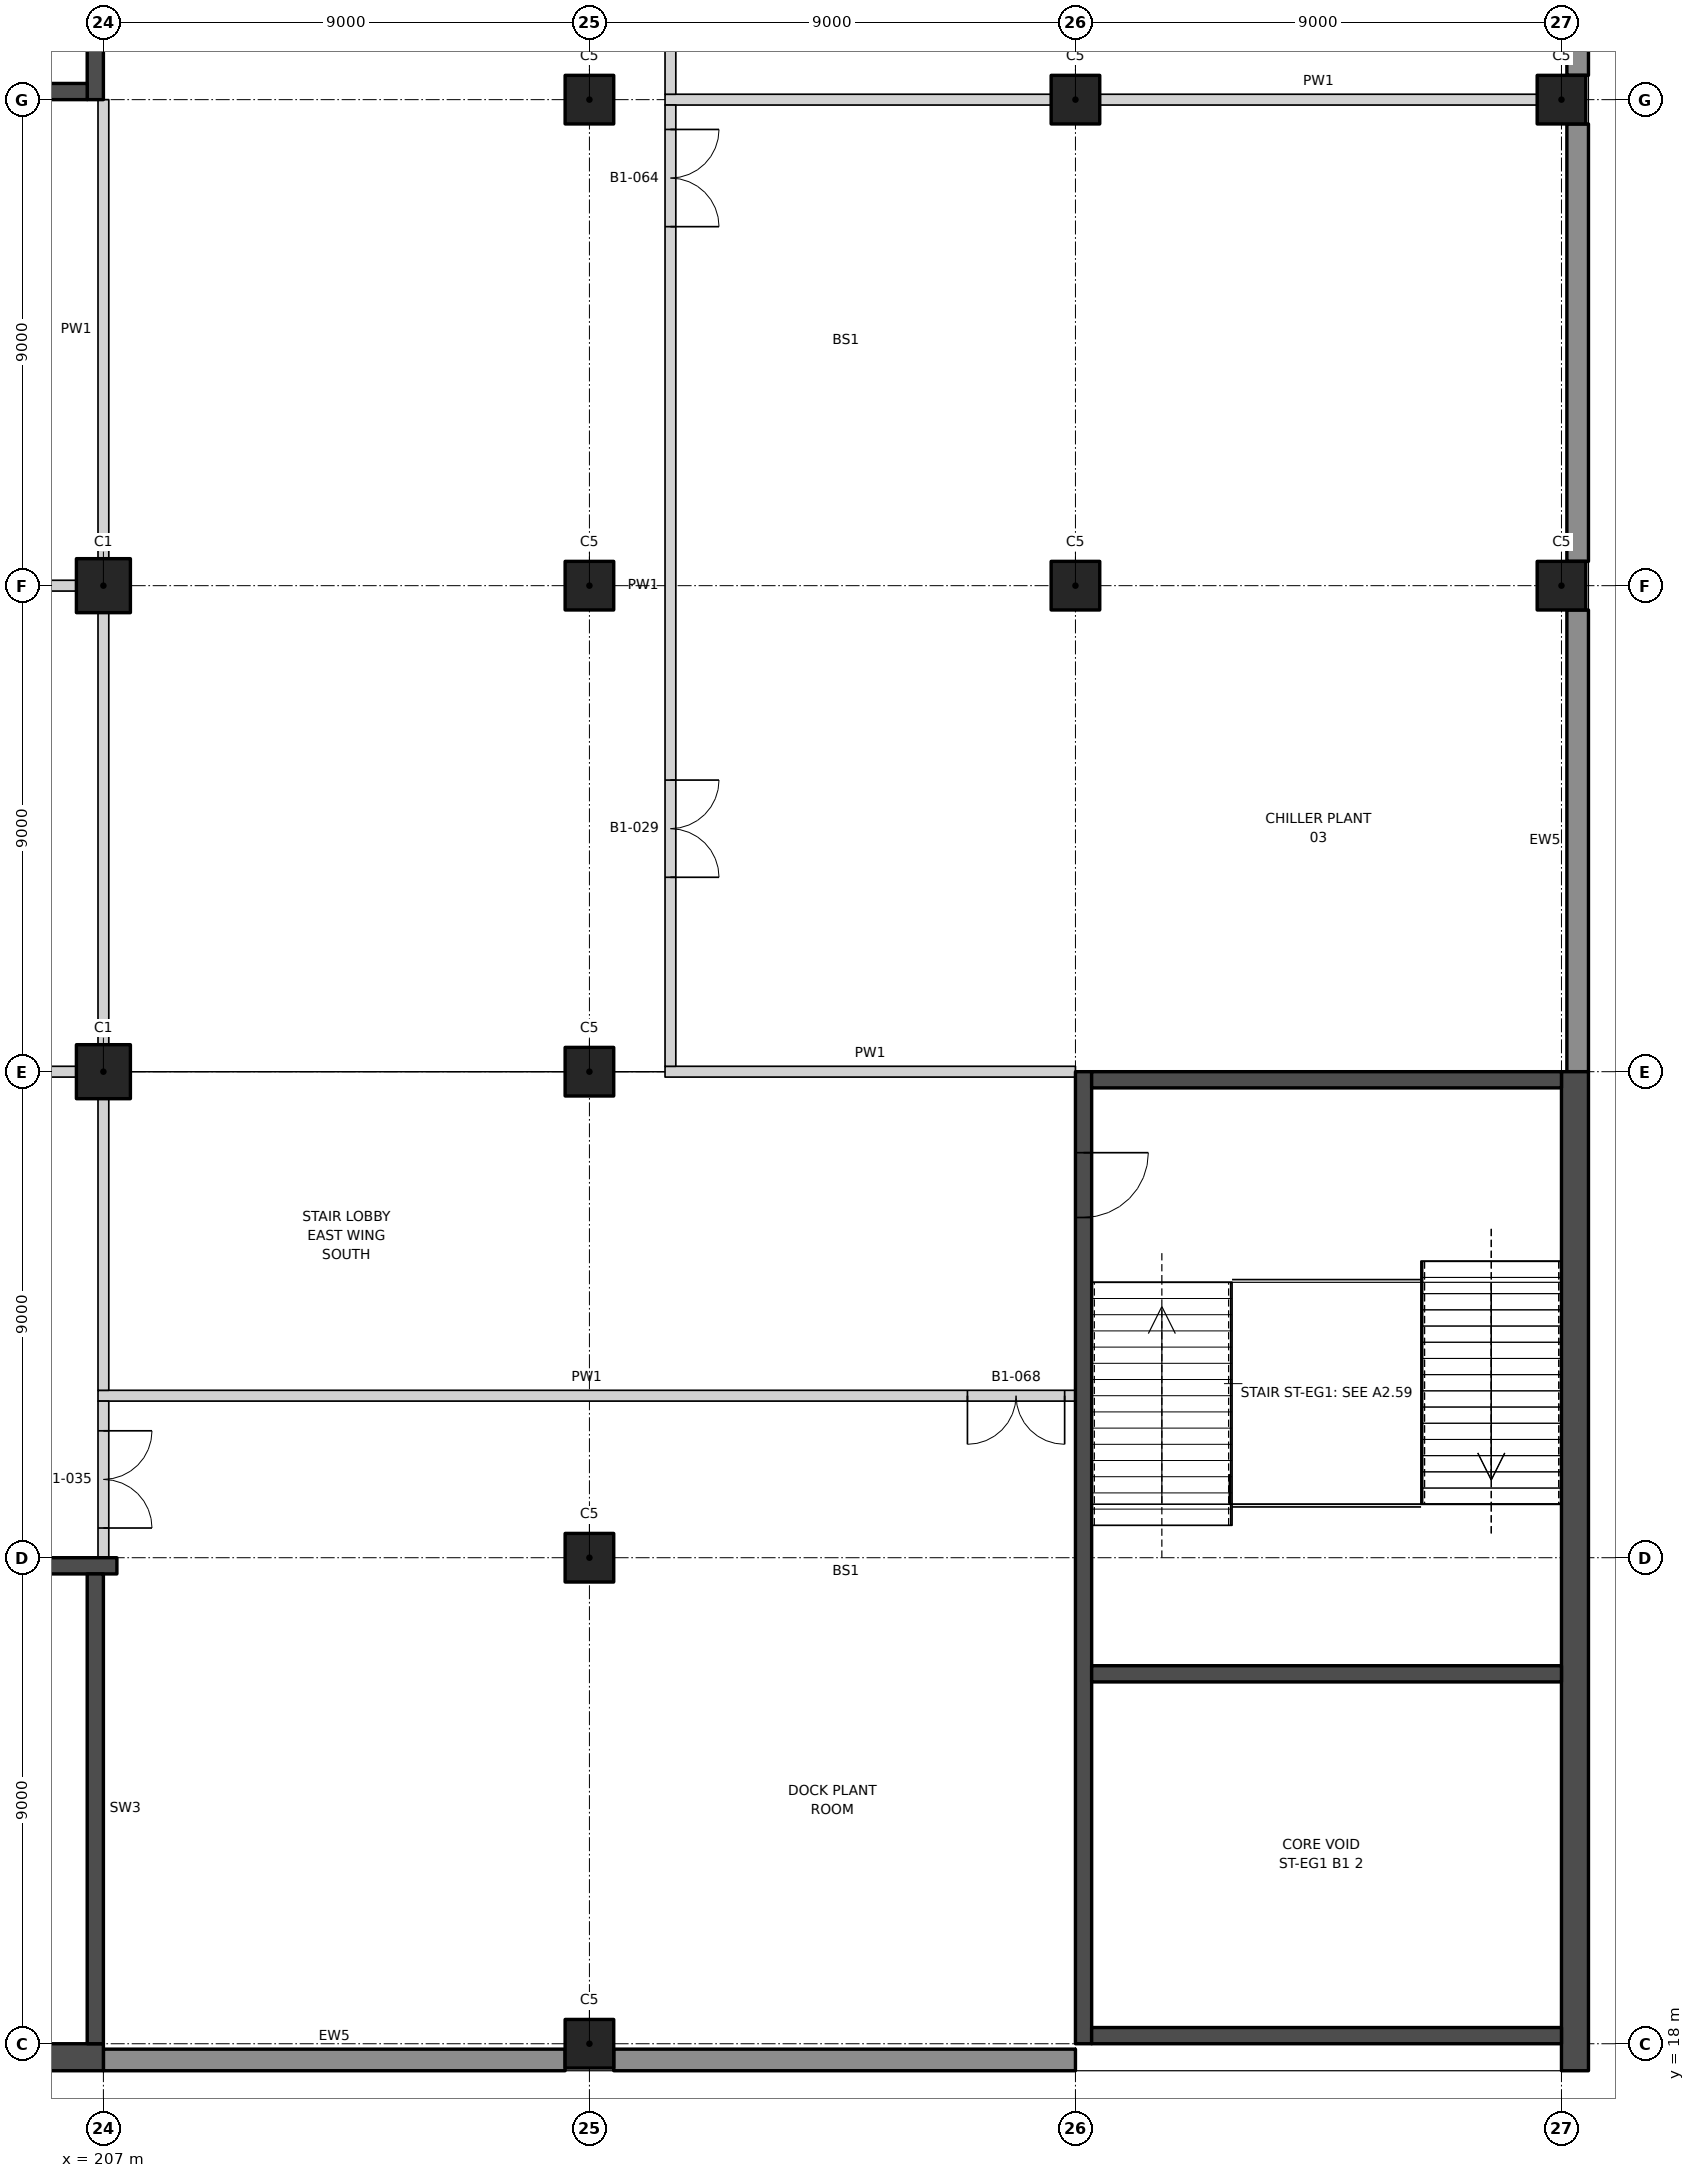
"""IFC4 building model, lengths in metres.
Left out: names, types, materials, properties, quantities, classifications, styles, units other than length and angle.
Written with IfcOpenShell. Run it as: python <this file> out.ifc"""

import sys

from ifc_helpers import new_model, si_unit, direction, frame, frame_2d, origin, origin_2d, place, context, subcontext, project, spatial, rectangle, extrude, element, fill, save


model = new_model("IFC4")
c1 = context("Model", 3, precision=1e-05, world=origin(), true_north=direction((0.0, 1.0)))
c2 = subcontext(c1, "Body", "Model", "MODEL_VIEW")
j1 = project(units=[si_unit("LENGTHUNIT", "METRE"), si_unit("PLANEANGLEUNIT", "RADIAN")], contexts=[c1])
p1 = place(None, origin())
s1 = spatial("IfcSite", under=j1, at=p1, CompositionType="ELEMENT")
p2 = place(p1, origin())
s2 = spatial("IfcBuilding", under=s1, at=p2, CompositionType="ELEMENT")
p3 = place(p2, frame((0.0, 0.0, -6.0)))
s3 = spatial("IfcBuildingStorey", under=s2, at=p3, CompositionType="ELEMENT", Elevation=-6.0)
for number, where, z_axis, x_axis in (
    (1, (207.0, 36.0, 0.0), (0.0, 0.0, 1.0), (1.0, 0.0, 0.0)),
    (2, (207.0, 45.0, 0.0), (0.0, 0.0, 1.0), (1.0, 0.0, 0.0)),
):
    element("IfcColumn", number, at=place(p3, frame(where, z_axis=z_axis, x_axis=x_axis)), inside=s3, PredefinedType="COLUMN", context=c2, shape_type="SweptSolid", body=[
        extrude(rectangle(XDim=1.0, YDim=1.0, at=origin_2d()), origin(), (0.0, 0.0, 1.0), 6.0),
    ])
for number, where, z_axis, x_axis in (
    (3, (216.0, 18.0, 0.0), (0.0, 0.0, 1.0), (1.0, 0.0, 0.0)),
    (4, (216.0, 27.0, 0.0), (0.0, 0.0, 1.0), (1.0, 0.0, 0.0)),
    (5, (216.0, 36.0, 0.0), (0.0, 0.0, 1.0), (1.0, 0.0, 0.0)),
    (6, (216.0, 45.0, 0.0), (0.0, 0.0, 1.0), (1.0, 0.0, 0.0)),
    (7, (216.0, 54.0, 0.0), (0.0, 0.0, 1.0), (1.0, 0.0, 0.0)),
    (8, (225.0, 45.0, 0.0), (0.0, 0.0, 1.0), (1.0, 0.0, 0.0)),
    (9, (225.0, 54.0, 0.0), (0.0, 0.0, 1.0), (1.0, 0.0, 0.0)),
    (10, (234.0, 45.0, 0.0), (0.0, 0.0, 1.0), (1.0, 0.0, 0.0)),
    (11, (234.0, 54.0, 0.0), (0.0, 0.0, 1.0), (1.0, 0.0, 0.0)),
):
    element("IfcColumn", number, at=place(p3, frame(where, z_axis=z_axis, x_axis=x_axis)), inside=s3, PredefinedType="COLUMN", context=c2, shape_type="SweptSolid", body=[
        extrude(rectangle(XDim=0.9, YDim=0.9, at=origin_2d()), origin(), (0.0, 0.0, 1.0), 6.0),
    ])
p4 = place(p3, frame((206.9, 30.0, 0.0), z_axis=(0.0, 0.0, 1.0), x_axis=(1.0, 0.0, 0.0)))
e12 = element("IfcWall", 12, at=p4, inside=s3, PredefinedType="PARTITIONING", context=c2, shape_type="SweptSolid", body=[
    extrude(rectangle(XDim=18.1, YDim=0.2, at=frame_2d((9.05, 0.0))), origin(), (0.0, 0.0, 1.0), 6.0),
])
p5 = place(p4, frame((16.1, 0.0, 0.0)))
e13 = element("IfcOpeningElement", 13, at=p5, cuts=e12, PredefinedType="OPENING", context=c2, shape_type="SweptSolid", body=[
    extrude(rectangle(XDim=1.8, YDim=2.1, at=frame_2d((0.9, 1.05))), frame((0.0, 0.11, 0.0), z_axis=(0.0, -1.0, 0.0), x_axis=(1.0, 0.0, 0.0)), (0.0, 0.0, 1.0), 0.22),
])
p6 = place(p3, frame((198.45, 36.0, 0.0), z_axis=(0.0, 0.0, 1.0), x_axis=(1.0, 0.0, 0.0)))
e14 = element("IfcWall", 14, at=p6, inside=s3, PredefinedType="PARTITIONING", context=c2, shape_type="SweptSolid", body=[
    extrude(rectangle(XDim=8.05, YDim=0.2, at=frame_2d((4.025, 0.0))), origin(), (0.0, 0.0, 1.0), 4.65),
])
p7 = place(p3, frame((217.4, 36.0, 0.0), z_axis=(0.0, 0.0, 1.0), x_axis=(1.0, 0.0, 0.0)))
e15 = element("IfcWall", 15, at=p7, inside=s3, PredefinedType="PARTITIONING", context=c2, shape_type="SweptSolid", body=[
    extrude(rectangle(XDim=7.6, YDim=0.2, at=frame_2d((3.8, 0.0))), origin(), (0.0, 0.0, 1.0), 4.65),
])
p8 = place(p3, frame((198.45, 45.0, 0.0), z_axis=(0.0, 0.0, 1.0), x_axis=(1.0, 0.0, 0.0)))
e16 = element("IfcWall", 16, at=p8, inside=s3, PredefinedType="PARTITIONING", context=c2, shape_type="SweptSolid", body=[
    extrude(rectangle(XDim=8.05, YDim=0.2, at=frame_2d((4.025, 0.0))), origin(), (0.0, 0.0, 1.0), 4.65),
])
p9 = place(p3, frame((225.45, 54.0, 0.0), z_axis=(0.0, 0.0, 1.0), x_axis=(1.0, 0.0, 0.0)))
e17 = element("IfcWall", 17, at=p9, inside=s3, PredefinedType="PARTITIONING", context=c2, shape_type="SweptSolid", body=[
    extrude(rectangle(XDim=8.1, YDim=0.2, at=frame_2d((4.05, 0.0))), origin(), (0.0, 0.0, 1.0), 4.65),
])
p10 = place(p3, frame((217.4, 54.0, 0.0), z_axis=(0.0, 0.0, 1.0), x_axis=(1.0, 0.0, 0.0)))
e18 = element("IfcWall", 18, at=p10, inside=s3, PredefinedType="PARTITIONING", context=c2, shape_type="SweptSolid", body=[
    extrude(rectangle(XDim=7.15, YDim=0.2, at=frame_2d((3.575, 0.0))), origin(), (0.0, 0.0, 1.0), 4.65),
])
p11 = place(p3, frame((207.0, 27.0, 0.0), z_axis=(0.0, 0.0, 1.0), x_axis=(0.0, 1.0, 0.0)))
e19 = element("IfcWall", 19, at=p11, inside=s3, PredefinedType="PARTITIONING", context=c2, shape_type="SweptSolid", body=[
    extrude(rectangle(XDim=2.9, YDim=0.2, at=frame_2d((1.45, 0.0))), origin(), (0.0, 0.0, 1.0), 4.65),
])
p12 = place(p11, frame((0.55, 0.0, 0.0)))
e20 = element("IfcOpeningElement", 20, at=p12, cuts=e19, PredefinedType="OPENING", context=c2, shape_type="SweptSolid", body=[
    extrude(rectangle(XDim=1.8, YDim=2.1, at=frame_2d((0.9, 1.05))), frame((0.0, 0.11, 0.0), z_axis=(0.0, -1.0, 0.0), x_axis=(1.0, 0.0, 0.0)), (0.0, 0.0, 1.0), 0.22),
])
p13 = place(p3, frame((207.0, 30.1, 0.0), z_axis=(0.0, 0.0, 1.0), x_axis=(0.0, 1.0, 0.0)))
e21 = element("IfcWall", 21, at=p13, inside=s3, PredefinedType="PARTITIONING", context=c2, shape_type="SweptSolid", body=[
    extrude(rectangle(XDim=5.4, YDim=0.2, at=frame_2d((2.7, 0.0))), origin(), (0.0, 0.0, 1.0), 4.65),
])
p14 = place(p3, frame((207.0, 36.5, 0.0), z_axis=(0.0, 0.0, 1.0), x_axis=(0.0, 1.0, 0.0)))
e22 = element("IfcWall", 22, at=p14, inside=s3, PredefinedType="PARTITIONING", context=c2, shape_type="SweptSolid", body=[
    extrude(rectangle(XDim=8.0, YDim=0.2, at=frame_2d((4.0, 0.0))), origin(), (0.0, 0.0, 1.0), 4.65),
])
p15 = place(p3, frame((207.0, 45.5, 0.0), z_axis=(0.0, 0.0, 1.0), x_axis=(0.0, 1.0, 0.0)))
e23 = element("IfcWall", 23, at=p15, inside=s3, PredefinedType="PARTITIONING", context=c2, shape_type="SweptSolid", body=[
    extrude(rectangle(XDim=8.5, YDim=0.2, at=frame_2d((4.25, 0.0))), origin(), (0.0, 0.0, 1.0), 4.65),
])
p16 = place(p3, frame((217.5, 36.1, 0.0), z_axis=(0.0, 0.0, 1.0), x_axis=(0.0, 1.0, 0.0)))
e24 = element("IfcWall", 24, at=p16, inside=s3, PredefinedType="PARTITIONING", context=c2, shape_type="SweptSolid", body=[
    extrude(rectangle(XDim=17.8, YDim=0.2, at=frame_2d((8.9, 0.0))), origin(), (0.0, 0.0, 1.0), 6.0),
])
p17 = place(p16, frame((3.5, 0.0, 0.0)))
e25 = element("IfcOpeningElement", 25, at=p17, cuts=e24, PredefinedType="OPENING", context=c2, shape_type="SweptSolid", body=[
    extrude(rectangle(XDim=1.8, YDim=2.1, at=frame_2d((0.9, 1.05))), frame((0.0, 0.11, 0.0), z_axis=(0.0, -1.0, 0.0), x_axis=(1.0, 0.0, 0.0)), (0.0, 0.0, 1.0), 0.22),
])
p18 = place(p16, frame((15.548, 0.0, 0.0)))
e26 = element("IfcOpeningElement", 26, at=p18, cuts=e24, PredefinedType="OPENING", context=c2, shape_type="SweptSolid", body=[
    extrude(rectangle(XDim=1.8, YDim=2.1, at=frame_2d((0.9, 1.05))), frame((0.0, 0.11, 0.0), z_axis=(0.0, -1.0, 0.0), x_axis=(1.0, 0.0, 0.0)), (0.0, 0.0, 1.0), 0.22),
])
p19 = place(p3, frame((217.5, 54.1, 0.0), z_axis=(0.0, 0.0, 1.0), x_axis=(0.0, 1.0, 0.0)))
e27 = element("IfcWall", 27, at=p19, inside=s3, PredefinedType="PARTITIONING", context=c2, shape_type="SweptSolid", body=[
    extrude(rectangle(XDim=11.8, YDim=0.2, at=frame_2d((5.9, 0.0))), origin(), (0.0, 0.0, 1.0), 6.0),
])
p20 = place(p19, frame((3.5, 0.0, 0.0)))
e28 = element("IfcOpeningElement", 28, at=p20, cuts=e27, PredefinedType="OPENING", context=c2, shape_type="SweptSolid", body=[
    extrude(rectangle(XDim=1.8, YDim=2.1, at=frame_2d((0.9, 1.05))), frame((0.0, 0.11, 0.0), z_axis=(0.0, -1.0, 0.0), x_axis=(1.0, 0.0, 0.0)), (0.0, 0.0, 1.0), 0.22),
])
p21 = place(p19, frame((9.8, 0.0, 0.0)))
e29 = element("IfcOpeningElement", 29, at=p21, cuts=e27, PredefinedType="OPENING", context=c2, shape_type="SweptSolid", body=[
    extrude(rectangle(XDim=1.8, YDim=2.1, at=frame_2d((0.9, 1.05))), frame((0.0, 0.11, 0.0), z_axis=(0.0, -1.0, 0.0), x_axis=(1.0, 0.0, 0.0)), (0.0, 0.0, 1.0), 0.22),
])
for number, where, z_axis, x_axis in (
    (30, (207.0, 17.7, 0.0), (0.0, 0.0, 1.0), (1.0, 0.0, 0.0)),
    (31, (216.45, 17.7, 0.0), (0.0, 0.0, 1.0), (1.0, 0.0, 0.0)),
    (32, (234.3, 36.0, 0.0), (0.0, 0.0, 1.0), (0.0, 1.0, 0.0)),
):
    element("IfcWall", number, at=place(p3, frame(where, z_axis=z_axis, x_axis=x_axis)), inside=s3, PredefinedType="SOLIDWALL", context=c2, shape_type="SweptSolid", body=[
        extrude(rectangle(XDim=8.55, YDim=0.4, at=frame_2d((4.275, 0.0))), origin(), (0.0, 0.0, 1.0), 6.0),
    ])
for number, where, z_axis, x_axis in (
    (33, (234.3, 45.45, 0.0), (0.0, 0.0, 1.0), (0.0, 1.0, 0.0)),
    (34, (234.3, 54.45, 0.0), (0.0, 0.0, 1.0), (0.0, 1.0, 0.0)),
):
    element("IfcWall", number, at=place(p3, frame(where, z_axis=z_axis, x_axis=x_axis)), inside=s3, PredefinedType="SOLIDWALL", context=c2, shape_type="SweptSolid", body=[
        extrude(rectangle(XDim=8.1, YDim=0.4, at=frame_2d((4.05, 0.0))), origin(), (0.0, 0.0, 1.0), 6.0),
    ])
p22 = place(p3, frame((189.0, 26.85, 0.0), z_axis=(0.0, 0.0, 1.0), x_axis=(1.0, 0.0, 0.0)))
e35 = element("IfcWall", 35, at=p22, inside=s3, PredefinedType="SHEAR", context=c2, shape_type="SweptSolid", body=[
    extrude(rectangle(XDim=18.25, YDim=0.3, at=frame_2d((9.125, 0.0))), origin(), (0.0, 0.0, 1.0), 6.0),
])
p23 = place(p3, frame((189.0, 17.75, 0.0), z_axis=(0.0, 0.0, 1.0), x_axis=(1.0, 0.0, 0.0)))
e36 = element("IfcWall", 36, at=p23, inside=s3, PredefinedType="SHEAR", context=c2, shape_type="SweptSolid", body=[
    extrude(rectangle(XDim=18.0, YDim=0.5, at=frame_2d((9.0, 0.0))), origin(), (0.0, 0.0, 1.0), 6.0),
])
p24 = place(p3, frame((206.85, 26.7, 0.0), z_axis=(0.0, 0.0, 1.0), x_axis=(0.0, -1.0, 0.0)))
e37 = element("IfcWall", 37, at=p24, inside=s3, PredefinedType="SHEAR", context=c2, shape_type="SweptSolid", body=[
    extrude(rectangle(XDim=8.7, YDim=0.3, at=frame_2d((4.35, 0.0))), origin(), (0.0, 0.0, 1.0), 6.0),
])
p25 = place(p3, frame((206.85, 54.0, 0.0), z_axis=(0.0, 0.0, 1.0), x_axis=(0.0, 1.0, 0.0)))
e38 = element("IfcWall", 38, at=p25, inside=s3, PredefinedType="SHEAR", context=c2, shape_type="SweptSolid", body=[
    extrude(rectangle(XDim=18.0, YDim=0.3, at=frame_2d((9.0, 0.0))), origin(), (0.0, 0.0, 1.0), 6.0),
])
p26 = place(p3, frame((198.3, 54.15, 0.0), z_axis=(0.0, 0.0, 1.0), x_axis=(1.0, 0.0, 0.0)))
e39 = element("IfcWall", 39, at=p26, inside=s3, PredefinedType="SHEAR", context=c2, shape_type="SweptSolid", body=[
    extrude(rectangle(XDim=8.4, YDim=0.3, at=frame_2d((4.2, 0.0))), origin(), (0.0, 0.0, 1.0), 6.0),
])
p27 = place(p3, frame((225.15, 36.0, 0.0), z_axis=(0.0, 0.0, 1.0), x_axis=(0.0, -1.0, 0.0)))
e40 = element("IfcWall", 40, at=p27, inside=s3, PredefinedType="SHEAR", context=c2, shape_type="SweptSolid", body=[
    extrude(rectangle(XDim=18.0, YDim=0.3, at=frame_2d((9.0, 0.0))), origin(), (0.0, 0.0, 1.0), 6.0),
])
p28 = place(p27, frame((1.5, 0.0, 0.0)))
e41 = element("IfcOpeningElement", 41, at=p28, cuts=e40, PredefinedType="OPENING", context=c2, shape_type="SweptSolid", body=[
    extrude(rectangle(XDim=1.2, YDim=2.1, at=frame_2d((0.6, 1.05))), frame((0.0, 0.16, 0.0), z_axis=(0.0, -1.0, 0.0), x_axis=(1.0, 0.0, 0.0)), (0.0, 0.0, 1.0), 0.32),
])
p29 = place(p3, frame((234.25, 36.0, 0.0), z_axis=(0.0, 0.0, 1.0), x_axis=(0.0, -1.0, 0.0)))
e42 = element("IfcWall", 42, at=p29, inside=s3, PredefinedType="SHEAR", context=c2, shape_type="SweptSolid", body=[
    extrude(rectangle(XDim=18.5, YDim=0.5, at=frame_2d((9.25, 0.0))), origin(), (0.0, 0.0, 1.0), 6.0),
])
for number, where, z_axis, x_axis in (
    (43, (225.3, 35.85, 0.0), (0.0, 0.0, 1.0), (1.0, 0.0, 0.0)),
    (44, (225.3, 18.15, 0.0), (0.0, 0.0, 1.0), (1.0, 0.0, 0.0)),
    (45, (225.3, 24.85, 0.0), (0.0, 0.0, 1.0), (1.0, 0.0, 0.0)),
):
    element("IfcWall", number, at=place(p3, frame(where, z_axis=z_axis, x_axis=x_axis)), inside=s3, PredefinedType="SHEAR", context=c2, shape_type="SweptSolid", body=[
        extrude(rectangle(XDim=8.7, YDim=0.3, at=frame_2d((4.35, 0.0))), origin(), (0.0, 0.0, 1.0), 6.0),
    ])
p30 = place(p17, frame((1.8, 0.0, 0.0), z_axis=(0.0, 0.0, 1.0), x_axis=(-1.0, 0.0, 0.0)))
e46 = element("IfcDoor", 46, at=p30, inside=s3, OperationType="DOUBLE_DOOR_DOUBLE_SWING", PredefinedType="DOOR", context=c2, shape_type="SweptSolid", body=[
    extrude(rectangle(XDim=1.8, YDim=2.1, at=frame_2d((0.9, 1.05))), frame((0.0, 0.025, 0.0), z_axis=(0.0, -1.0, 0.0), x_axis=(1.0, 0.0, 0.0)), (0.0, 0.0, 1.0), 0.05),
])
fill(e25, e46)
p31 = place(p12, frame((1.8, 0.0, 0.0), z_axis=(0.0, 0.0, 1.0), x_axis=(-1.0, 0.0, 0.0)))
e47 = element("IfcDoor", 47, at=p31, inside=s3, OperationType="DOUBLE_DOOR_DOUBLE_SWING", PredefinedType="DOOR", context=c2, shape_type="SweptSolid", body=[
    extrude(rectangle(XDim=1.8, YDim=2.1, at=frame_2d((0.9, 1.05))), frame((0.0, 0.025, 0.0), z_axis=(0.0, -1.0, 0.0), x_axis=(1.0, 0.0, 0.0)), (0.0, 0.0, 1.0), 0.05),
])
fill(e20, e47)
p32 = place(p18, frame((1.8, 0.0, 0.0), z_axis=(0.0, 0.0, 1.0), x_axis=(-1.0, 0.0, 0.0)))
e48 = element("IfcDoor", 48, at=p32, inside=s3, OperationType="DOUBLE_DOOR_DOUBLE_SWING", PredefinedType="DOOR", context=c2, shape_type="SweptSolid", body=[
    extrude(rectangle(XDim=1.8, YDim=2.1, at=frame_2d((0.9, 1.05))), frame((0.0, 0.025, 0.0), z_axis=(0.0, -1.0, 0.0), x_axis=(1.0, 0.0, 0.0)), (0.0, 0.0, 1.0), 0.05),
])
fill(e26, e48)
p33 = place(p5, frame((1.8, 0.0, 0.0), z_axis=(0.0, 0.0, 1.0), x_axis=(-1.0, 0.0, 0.0)))
e49 = element("IfcDoor", 49, at=p33, inside=s3, OperationType="DOUBLE_DOOR_DOUBLE_SWING", PredefinedType="DOOR", context=c2, shape_type="SweptSolid", body=[
    extrude(rectangle(XDim=1.8, YDim=2.1, at=frame_2d((0.9, 1.05))), frame((0.0, 0.025, 0.0), z_axis=(0.0, -1.0, 0.0), x_axis=(1.0, 0.0, 0.0)), (0.0, 0.0, 1.0), 0.05),
])
fill(e13, e49)
p34 = place(p28, origin())
e50 = element("IfcDoor", 50, at=p34, inside=s3, OperationType="SINGLE_SWING_LEFT", PredefinedType="DOOR", context=c2, shape_type="SweptSolid", body=[
    extrude(rectangle(XDim=1.2, YDim=2.1, at=frame_2d((0.6, 1.05))), frame((0.0, 0.025, 0.0), z_axis=(0.0, -1.0, 0.0), x_axis=(1.0, 0.0, 0.0)), (0.0, 0.0, 1.0), 0.05),
])
fill(e41, e50)
save(model, sys.argv[1])
